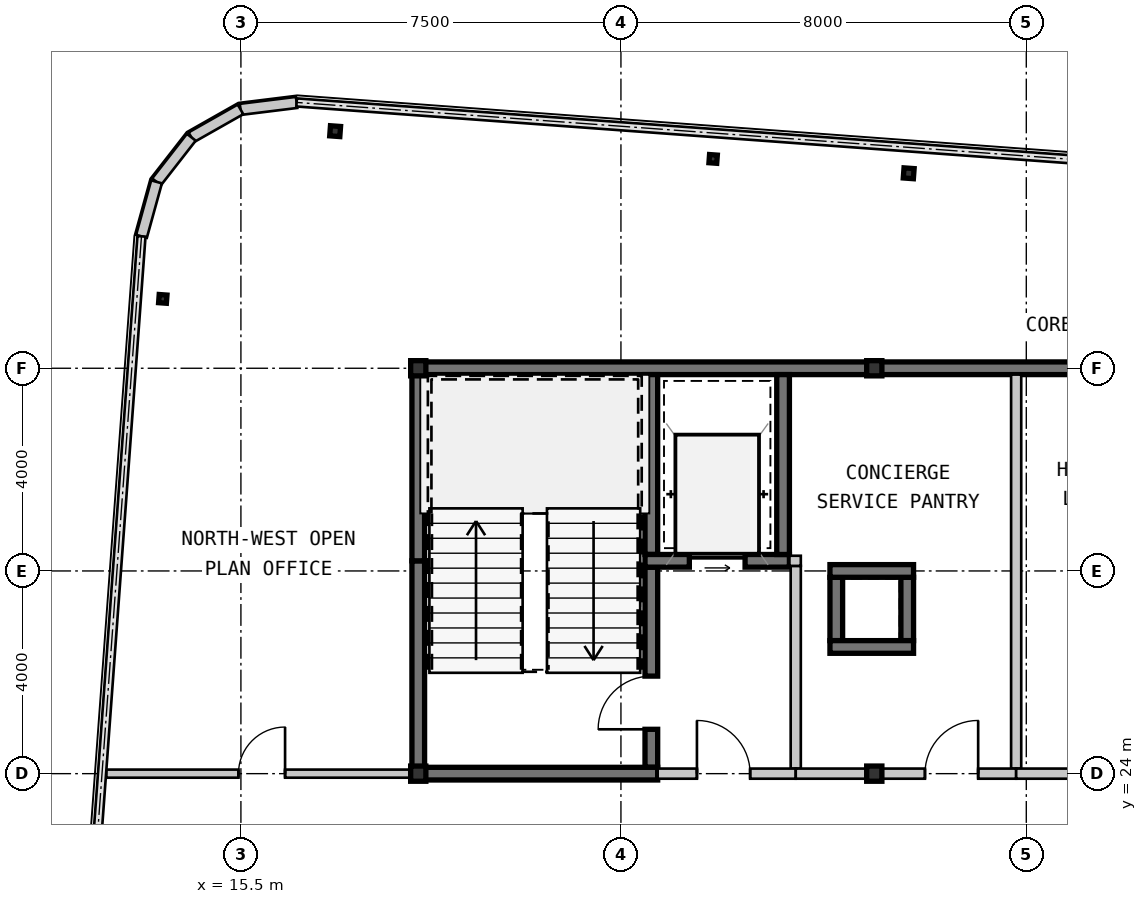
"""IFC4 building model, lengths in metres.
Left out: names, types, materials, properties, quantities, classifications, styles, units other than length and angle.
Written with IfcOpenShell. Run it as: python <this file> out.ifc"""

import sys

from ifc_helpers import new_model, si_unit, direction, frame, frame_2d, origin, origin_2d, place, context, subcontext, project, spatial, rectangle, hollow_rectangle, i_section, extrude, source, transform, mapped, element, fill, save


model = new_model("IFC4")
c1 = context("Model", 3, precision=1e-05, world=origin(), true_north=direction((0.0, 1.0)))
c2 = subcontext(c1, "Body", "Model", "MODEL_VIEW")
j1 = project(units=[si_unit("LENGTHUNIT", "METRE"), si_unit("PLANEANGLEUNIT", "RADIAN")], contexts=[c1])
p1 = place(None, origin())
s1 = spatial("IfcSite", under=j1, at=p1, CompositionType="ELEMENT")
p2 = place(p1, origin())
s2 = spatial("IfcBuilding", under=s1, at=p2, CompositionType="ELEMENT")
p3 = place(p2, frame((0.0, 0.0, 239.75)))
s3 = spatial("IfcBuildingStorey", under=s2, at=p3, CompositionType="ELEMENT", Elevation=239.75)
m1 = source(origin(), c2, "Body", "SweptSolid", [
    extrude(hollow_rectangle(XDim=0.3, YDim=0.3, WallThickness=0.012, at=origin_2d()), origin(), (0.0, 0.0, 1.0), 3.15),
])
for number, where, z_axis, x_axis in (
    (1, (19.0, 24.0, 0.0), (0.0, 0.0, 1.0), (1.0, 0.0, 0.0)),
    (2, (28.0, 24.0, 0.0), (0.0, 0.0, 1.0), (1.0, 0.0, 0.0)),
    (3, (19.0, 32.0, 0.0), (0.0, 0.0, 1.0), (1.0, 0.0, 0.0)),
    (4, (28.0, 32.0, 0.0), (0.0, 0.0, 1.0), (1.0, 0.0, 0.0)),
):
    element("IfcColumn", number, at=place(p3, frame(where, z_axis=z_axis, x_axis=x_axis)), inside=s3, PredefinedType="COLUMN", context=c2, shape_type="MappedRepresentation", body=[
        mapped(m1, transform((0.0, 0.0, 0.0), scale=1.0)),
    ])
m2 = source(origin(), c2, "Body", "SweptSolid", [
    extrude(hollow_rectangle(XDim=0.2, YDim=0.2, WallThickness=0.009, at=origin_2d()), origin(), (0.0, 0.0, 1.0), 3.15),
])
p4 = place(p3, frame((17.36, 36.679, 0.0), z_axis=(0.0, 0.0, 1.0), x_axis=(0.997314477224, -0.073238197128, 0.0)))
e5 = element("IfcColumn", 5, at=p4, inside=s3, PredefinedType="COLUMN", context=c2, shape_type="MappedRepresentation", body=[
    mapped(m2, transform((0.0, 0.0, 0.0), scale=1.0)),
])
m3 = source(origin(), c2, "Body", "SweptSolid", [
    extrude(i_section(OverallWidth=0.154, OverallDepth=0.162, WebThickness=0.008, FlangeThickness=0.011, at=origin_2d()), origin(), (0.0, 0.0, 1.0), 3.15),
])
for number, where, z_axis, x_axis in (
    (6, (24.82, 36.131, 0.0), (0.0, 0.0, 1.0), (0.997, -0.073, 0.0)),
    (7, (13.958, 33.369, 0.0), (0.0, 0.0, 1.0), (0.997, -0.073, 0.0)),
):
    element("IfcColumn", number, at=place(p3, frame(where, z_axis=z_axis, x_axis=x_axis)), inside=s3, PredefinedType="COLUMN", context=c2, shape_type="MappedRepresentation", body=[
        mapped(m3, transform((0.0, 0.0, 0.0), scale=1.0)),
    ])
p5 = place(p3, frame((28.679, 35.848, 0.0), z_axis=(0.0, 0.0, 1.0), x_axis=(0.997314477224, -0.073238197128, 0.0)))
e8 = element("IfcColumn", 8, at=p5, inside=s3, PredefinedType="COLUMN", context=c2, shape_type="MappedRepresentation", body=[
    mapped(m2, transform((0.0, 0.0, 0.0), scale=1.0)),
])
m4 = source(origin(), c2, "Body", "SweptSolid", [
    extrude(rectangle(XDim=1.116, YDim=0.22, at=frame_2d((0.558, 0.0))), origin(), (0.0, 0.0, 1.0), 2.93),
])
p6 = place(p3, frame((16.599, 37.246, 0.0), z_axis=(0.0, 0.0, 1.0), x_axis=(-0.992441899189, -0.122715429897, 0.0)))
e9 = element("IfcWall", 9, at=p6, inside=s3, PredefinedType="SOLIDWALL", context=c2, shape_type="MappedRepresentation", body=[
    mapped(m4, transform((0.0, 0.0, 0.0), scale=1.0)),
])
m5 = source(origin(), c2, "Body", "SweptSolid", [
    extrude(rectangle(XDim=1.116, YDim=0.22, at=frame_2d((0.558, 0.0))), origin(), (0.0, 0.0, 1.0), 2.93),
])
p7 = place(p3, frame((15.492, 37.109, 0.0), z_axis=(0.0, 0.0, 1.0), x_axis=(-0.869934579941, -0.493167138628, 0.0)))
e10 = element("IfcWall", 10, at=p7, inside=s3, PredefinedType="SOLIDWALL", context=c2, shape_type="MappedRepresentation", body=[
    mapped(m5, transform((0.0, 0.0, 0.0), scale=1.0)),
])
m6 = source(origin(), c2, "Body", "SweptSolid", [
    extrude(rectangle(XDim=1.116, YDim=0.22, at=frame_2d((0.558, 0.0))), origin(), (0.0, 0.0, 1.0), 2.93),
])
p8 = place(p3, frame((14.521, 36.559, 0.0), z_axis=(0.0, 0.0, 1.0), x_axis=(-0.614909386406, -0.788597772321, 0.0)))
e11 = element("IfcWall", 11, at=p8, inside=s3, PredefinedType="SOLIDWALL", context=c2, shape_type="MappedRepresentation", body=[
    mapped(m6, transform((0.0, 0.0, 0.0), scale=1.0)),
])
p9 = place(p3, frame((13.835, 35.679, 0.0), z_axis=(0.0, 0.0, 1.0), x_axis=(-0.266300605026, -0.963890028874, 0.0)))
e12 = element("IfcWall", 12, at=p9, inside=s3, PredefinedType="SOLIDWALL", context=c2, shape_type="MappedRepresentation", body=[
    mapped(m5, transform((0.0, 0.0, 0.0), scale=1.0)),
])
m7 = source(origin(), c2, "Body", "SweptSolid", [
    extrude(rectangle(XDim=9.125, YDim=0.25, at=frame_2d((4.562, 0.0))), origin(), (0.0, 0.0, 1.0), 2.93),
])
p10 = place(p3, frame((18.875, 32.0, 0.0), z_axis=(0.0, 0.0, 1.0), x_axis=(1.0, 0.0, 0.0)))
e13 = element("IfcWall", 13, at=p10, inside=s3, PredefinedType="SHEAR", context=c2, shape_type="MappedRepresentation", body=[
    mapped(m7, transform((0.0, 0.0, 0.0), scale=1.0)),
])
m8 = source(origin(), c2, "Body", "SweptSolid", [
    extrude(rectangle(XDim=11.2, YDim=0.25, at=frame_2d((5.6, 0.0))), origin(), (0.0, 0.0, 1.0), 2.93),
])
p11 = place(p3, frame((28.0, 32.0, 0.0), z_axis=(0.0, 0.0, 1.0), x_axis=(1.0, 0.0, 0.0)))
e14 = element("IfcWall", 14, at=p11, inside=s3, PredefinedType="SHEAR", context=c2, shape_type="MappedRepresentation", body=[
    mapped(m8, transform((0.0, 0.0, 0.0), scale=1.0)),
])
m9 = source(origin(), c2, "Body", "SweptSolid", [
    extrude(rectangle(XDim=4.075, YDim=0.25, at=frame_2d((2.038, 0.0))), origin(), (0.0, 0.0, 1.0), 2.93),
])
p12 = place(p3, frame((19.0, 24.125, 0.0), z_axis=(0.0, 0.0, 1.0), x_axis=(0.0, 1.0, 0.0)))
e15 = element("IfcWall", 15, at=p12, inside=s3, PredefinedType="SHEAR", context=c2, shape_type="MappedRepresentation", body=[
    mapped(m9, transform((0.0, 0.0, 0.0), scale=1.0)),
])
m10 = source(origin(), c2, "Body", "SweptSolid", [
    extrude(rectangle(XDim=3.675, YDim=0.25, at=frame_2d((1.837, 0.0))), origin(), (0.0, 0.0, 1.0), 2.93),
])
p13 = place(p3, frame((19.0, 28.2, 0.0), z_axis=(0.0, 0.0, 1.0), x_axis=(0.0, 1.0, 0.0)))
e16 = element("IfcWall", 16, at=p13, inside=s3, PredefinedType="SHEAR", context=c2, shape_type="MappedRepresentation", body=[
    mapped(m10, transform((0.0, 0.0, 0.0), scale=1.0)),
])
m11 = source(origin(), c2, "Body", "SweptSolid", [
    extrude(rectangle(XDim=3.55, YDim=0.25, at=frame_2d((1.775, 0.0))), origin(), (0.0, 0.0, 1.0), 2.93),
])
p14 = place(p3, frame((23.6, 28.325, 0.0), z_axis=(0.0, 0.0, 1.0), x_axis=(0.0, 1.0, 0.0)))
e17 = element("IfcWall", 17, at=p14, inside=s3, PredefinedType="SHEAR", context=c2, shape_type="MappedRepresentation", body=[
    mapped(m11, transform((0.0, 0.0, 0.0), scale=1.0)),
])
m12 = source(origin(), c2, "Body", "SweptSolid", [
    extrude(rectangle(XDim=3.95, YDim=0.25, at=frame_2d((1.975, 0.0))), origin(), (0.0, 0.0, 1.0), 2.93),
])
p15 = place(p3, frame((23.6, 24.125, 0.0), z_axis=(0.0, 0.0, 1.0), x_axis=(0.0, 1.0, 0.0)))
e18 = element("IfcWall", 18, at=p15, inside=s3, PredefinedType="SHEAR", context=c2, shape_type="MappedRepresentation", body=[
    mapped(m12, transform((0.0, 0.0, 0.0), scale=1.0)),
])
m13 = source(origin(), c2, "Body", "SweptSolid", [
    extrude(rectangle(XDim=1.05, YDim=2.1, at=frame_2d((0.525, 1.05))), frame((0.0, 0.135, 0.0), z_axis=(0.0, -1.0, 0.0), x_axis=(1.0, 0.0, 0.0)), (0.0, 0.0, 1.0), 0.27),
])
p16 = place(p15, frame((0.75, 0.0, 0.0)))
e19 = element("IfcOpeningElement", 19, at=p16, cuts=e18, PredefinedType="OPENING", context=c2, shape_type="MappedRepresentation", body=[
    mapped(m13, transform((0.0, 0.0, 0.0), scale=1.0)),
])
m14 = source(origin(), c2, "Body", "SweptSolid", [
    extrude(rectangle(XDim=4.85, YDim=0.25, at=frame_2d((2.425, 0.0))), origin(), (0.0, 0.0, 1.0), 2.93),
])
p17 = place(p3, frame((18.875, 24.0, 0.0), z_axis=(0.0, 0.0, 1.0), x_axis=(1.0, 0.0, 0.0)))
e20 = element("IfcWall", 20, at=p17, inside=s3, PredefinedType="SHEAR", context=c2, shape_type="MappedRepresentation", body=[
    mapped(m14, transform((0.0, 0.0, 0.0), scale=1.0)),
])
m15 = source(origin(), c2, "Body", "SweptSolid", [
    extrude(rectangle(XDim=2.85, YDim=0.25, at=frame_2d((1.425, 0.0))), origin(), (0.0, 0.0, 1.0), 2.93),
])
p18 = place(p3, frame((23.475, 28.2, 0.0), z_axis=(0.0, 0.0, 1.0), x_axis=(1.0, 0.0, 0.0)))
e21 = element("IfcWall", 21, at=p18, inside=s3, PredefinedType="SHEAR", context=c2, shape_type="MappedRepresentation", body=[
    mapped(m15, transform((0.0, 0.0, 0.0), scale=1.0)),
])
m16 = source(origin(), c2, "Body", "SweptSolid", [
    extrude(rectangle(XDim=1.1, YDim=2.15, at=frame_2d((0.55, 1.075))), frame((0.0, 0.135, 0.0), z_axis=(0.0, -1.0, 0.0), x_axis=(1.0, 0.0, 0.0)), (0.0, 0.0, 1.0), 0.27),
])
p19 = place(p18, frame((0.875, 0.0, 0.0)))
e22 = element("IfcOpeningElement", 22, at=p19, cuts=e21, PredefinedType="OPENING", context=c2, shape_type="MappedRepresentation", body=[
    mapped(m16, transform((0.0, 0.0, 0.0), scale=1.0)),
])
p20 = place(p3, frame((26.2, 28.325, 0.0), z_axis=(0.0, 0.0, 1.0), x_axis=(0.0, 1.0, 0.0)))
e23 = element("IfcWall", 23, at=p20, inside=s3, PredefinedType="SHEAR", context=c2, shape_type="MappedRepresentation", body=[
    mapped(m11, transform((0.0, 0.0, 0.0), scale=1.0)),
])
m17 = source(origin(), c2, "Body", "SweptSolid", [
    extrude(rectangle(XDim=4.0, YDim=0.2, at=frame_2d((2.0, 0.0))), origin(), (0.0, 0.0, 1.0), 2.93),
])
p21 = place(p3, frame((26.45, 24.1, 0.0), z_axis=(0.0, 0.0, 1.0), x_axis=(0.0, 1.0, 0.0)))
e24 = element("IfcWall", 24, at=p21, inside=s3, PredefinedType="SOLIDWALL", context=c2, shape_type="MappedRepresentation", body=[
    mapped(m17, transform((0.0, 0.0, 0.0), scale=1.0)),
])
m18 = source(origin(), c2, "Body", "SweptSolid", [
    extrude(rectangle(XDim=2.725, YDim=0.2, at=frame_2d((1.362, 0.0))), origin(), (0.0, 0.0, 1.0), 2.47),
])
p22 = place(p3, frame((23.725, 24.0, 0.0), z_axis=(0.0, 0.0, 1.0), x_axis=(1.0, 0.0, 0.0)))
e25 = element("IfcWall", 25, at=p22, inside=s3, PredefinedType="SOLIDWALL", context=c2, shape_type="MappedRepresentation", body=[
    mapped(m18, transform((0.0, 0.0, 0.0), scale=1.0)),
])
m19 = source(origin(), c2, "Body", "SweptSolid", [
    extrude(rectangle(XDim=1.05, YDim=2.1, at=frame_2d((0.525, 1.05))), frame((0.0, 0.11, 0.0), z_axis=(0.0, -1.0, 0.0), x_axis=(1.0, 0.0, 0.0)), (0.0, 0.0, 1.0), 0.22),
])
p23 = place(p22, frame((0.775, 0.0, 0.0)))
e26 = element("IfcOpeningElement", 26, at=p23, cuts=e25, PredefinedType="OPENING", context=c2, shape_type="MappedRepresentation", body=[
    mapped(m19, transform((0.0, 0.0, 0.0), scale=1.0)),
])
m20 = source(origin(), c2, "Body", "SweptSolid", [
    extrude(rectangle(XDim=1.25, YDim=0.25, at=frame_2d((0.625, 0.0))), origin(), (0.0, 0.0, 1.0), 2.93),
])
for number, where, z_axis, x_axis in (
    (27, (28.65, 26.625, 0.0), (0.0, 0.0, 1.0), (0.0, 1.0, 0.0)),
    (28, (27.25, 27.875, 0.0), (0.0, 0.0, 1.0), (0.0, -1.0, 0.0)),
):
    element("IfcWall", number, at=place(p3, frame(where, z_axis=z_axis, x_axis=x_axis)), inside=s3, PredefinedType="SHEAR", context=c2, shape_type="MappedRepresentation", body=[
        mapped(m20, transform((0.0, 0.0, 0.0), scale=1.0)),
    ])
m21 = source(origin(), c2, "Body", "SweptSolid", [
    extrude(rectangle(XDim=1.65, YDim=0.25, at=frame_2d((0.825, 0.0))), origin(), (0.0, 0.0, 1.0), 2.93),
])
for number, where, z_axis, x_axis in (
    (29, (28.775, 28.0, 0.0), (0.0, 0.0, 1.0), (-1.0, 0.0, 0.0)),
    (30, (27.125, 26.5, 0.0), (0.0, 0.0, 1.0), (1.0, 0.0, 0.0)),
):
    element("IfcWall", number, at=place(p3, frame(where, z_axis=z_axis, x_axis=x_axis)), inside=s3, PredefinedType="SHEAR", context=c2, shape_type="MappedRepresentation", body=[
        mapped(m21, transform((0.0, 0.0, 0.0), scale=1.0)),
    ])
m22 = source(origin(), c2, "Body", "SweptSolid", [
    extrude(rectangle(XDim=7.775, YDim=0.2, at=frame_2d((3.887, 0.0))), origin(), (0.0, 0.0, 1.0), 2.93),
])
p24 = place(p3, frame((30.8, 31.875, 0.0), z_axis=(0.0, 0.0, 1.0), x_axis=(0.0, -1.0, 0.0)))
e31 = element("IfcWall", 31, at=p24, inside=s3, PredefinedType="SOLIDWALL", context=c2, shape_type="MappedRepresentation", body=[
    mapped(m22, transform((0.0, 0.0, 0.0), scale=1.0)),
])
m23 = source(origin(), c2, "Body", "SweptSolid", [
    extrude(rectangle(XDim=4.35, YDim=0.2, at=frame_2d((2.175, 0.0))), origin(), (0.0, 0.0, 1.0), 2.47),
])
p25 = place(p3, frame((30.8, 24.0, 0.0), z_axis=(0.0, 0.0, 1.0), x_axis=(-1.0, 0.0, 0.0)))
e32 = element("IfcWall", 32, at=p25, inside=s3, PredefinedType="SOLIDWALL", context=c2, shape_type="MappedRepresentation", body=[
    mapped(m23, transform((0.0, 0.0, 0.0), scale=1.0)),
])
p26 = place(p25, frame((0.75, 0.0, 0.0)))
e33 = element("IfcOpeningElement", 33, at=p26, cuts=e32, PredefinedType="OPENING", context=c2, shape_type="MappedRepresentation", body=[
    mapped(m19, transform((0.0, 0.0, 0.0), scale=1.0)),
])
m24 = source(origin(), c2, "Body", "SweptSolid", [
    extrude(rectangle(XDim=4.35, YDim=0.2, at=frame_2d((2.175, 0.0))), origin(), (0.0, 0.0, 1.0), 2.47),
])
p27 = place(p3, frame((35.15, 24.0, 0.0), z_axis=(0.0, 0.0, 1.0), x_axis=(-1.0, 0.0, 0.0)))
e34 = element("IfcWall", 34, at=p27, inside=s3, PredefinedType="SOLIDWALL", context=c2, shape_type="MappedRepresentation", body=[
    mapped(m24, transform((0.0, 0.0, 0.0), scale=1.0)),
])
p28 = place(p27, frame((1.65, 0.0, 0.0)))
e35 = element("IfcOpeningElement", 35, at=p28, cuts=e34, PredefinedType="OPENING", context=c2, shape_type="MappedRepresentation", body=[
    mapped(m19, transform((0.0, 0.0, 0.0), scale=1.0)),
])
m25 = source(origin(), c2, "Body", "SweptSolid", [
    extrude(rectangle(XDim=6.032, YDim=0.16, at=frame_2d((3.016, 0.0))), origin(), (0.0, 0.0, 1.0), 2.93),
])
p29 = place(p3, frame((12.843, 24.0, 0.0), z_axis=(0.0, 0.0, 1.0), x_axis=(1.0, 0.0, 0.0)))
e36 = element("IfcWall", 36, at=p29, inside=s3, PredefinedType="PARTITIONING", context=c2, shape_type="MappedRepresentation", body=[
    mapped(m25, transform((0.0, 0.0, 0.0), scale=1.0)),
])
m26 = source(origin(), c2, "Body", "SweptSolid", [
    extrude(rectangle(XDim=0.92, YDim=2.1, at=frame_2d((0.46, 1.05))), frame((0.0, 0.09, 0.0), z_axis=(0.0, -1.0, 0.0), x_axis=(1.0, 0.0, 0.0)), (0.0, 0.0, 1.0), 0.18),
])
p30 = place(p29, frame((2.608, 0.0, 0.0)))
e37 = element("IfcOpeningElement", 37, at=p30, cuts=e36, PredefinedType="OPENING", context=c2, shape_type="MappedRepresentation", body=[
    mapped(m26, transform((0.0, 0.0, 0.0), scale=1.0)),
])
m27 = source(origin(), c2, "Body", "SweptSolid", [
    extrude(rectangle(XDim=0.225, YDim=0.2, at=frame_2d((0.113, 0.0))), origin(), (0.0, 0.0, 1.0), 2.93),
])
p31 = place(p3, frame((26.325, 28.2, 0.0), z_axis=(0.0, 0.0, 1.0), x_axis=(1.0, 0.0, 0.0)))
e38 = element("IfcWall", 38, at=p31, inside=s3, PredefinedType="SOLIDWALL", context=c2, shape_type="MappedRepresentation", body=[
    mapped(m27, transform((0.0, 0.0, 0.0), scale=1.0)),
])
m28 = source(origin(), c2, "Body", "SweptSolid", [
    extrude(rectangle(XDim=1.05, YDim=2.1, at=frame_2d((0.525, 1.05))), frame((0.0, 0.025, 0.0), z_axis=(0.0, -1.0, 0.0), x_axis=(1.0, 0.0, 0.0)), (0.0, 0.0, 1.0), 0.05),
])
p32 = place(p16, origin())
e39 = element("IfcDoor", 39, at=p32, inside=s3, OperationType="SINGLE_SWING_LEFT", PredefinedType="DOOR", context=c2, shape_type="MappedRepresentation", body=[
    mapped(m28, transform((0.0, 0.0, 0.0), scale=1.0)),
])
fill(e19, e39)
m29 = source(origin(), c2, "Body", "SweptSolid", [
    extrude(rectangle(XDim=1.1, YDim=2.15, at=frame_2d((0.55, 1.075))), frame((0.0, 0.025, 0.0), z_axis=(0.0, -1.0, 0.0), x_axis=(1.0, 0.0, 0.0)), (0.0, 0.0, 1.0), 0.05),
])
p33 = place(p19, origin())
e40 = element("IfcDoor", 40, at=p33, inside=s3, OperationType="SLIDING_TO_LEFT", PredefinedType="DOOR", context=c2, shape_type="MappedRepresentation", body=[
    mapped(m29, transform((0.0, 0.0, 0.0), scale=1.0)),
])
fill(e22, e40)
p34 = place(p23, origin())
e41 = element("IfcDoor", 41, at=p34, inside=s3, OperationType="SINGLE_SWING_LEFT", PredefinedType="DOOR", context=c2, shape_type="MappedRepresentation", body=[
    mapped(m28, transform((0.0, 0.0, 0.0), scale=1.0)),
])
fill(e26, e41)
p35 = place(p26, frame((1.05, 0.0, 0.0), z_axis=(0.0, 0.0, 1.0), x_axis=(-1.0, 0.0, 0.0)))
e42 = element("IfcDoor", 42, at=p35, inside=s3, OperationType="SINGLE_SWING_RIGHT", PredefinedType="DOOR", context=c2, shape_type="MappedRepresentation", body=[
    mapped(m28, transform((0.0, 0.0, 0.0), scale=1.0)),
])
fill(e33, e42)
m30 = source(origin(), c2, "Body", "SweptSolid", [
    extrude(rectangle(XDim=0.92, YDim=2.1, at=frame_2d((0.46, 1.05))), frame((0.0, 0.025, 0.0), z_axis=(0.0, -1.0, 0.0), x_axis=(1.0, 0.0, 0.0)), (0.0, 0.0, 1.0), 0.05),
])
p36 = place(p30, origin())
e43 = element("IfcDoor", 43, at=p36, inside=s3, OperationType="SINGLE_SWING_RIGHT", PredefinedType="DOOR", context=c2, shape_type="MappedRepresentation", body=[
    mapped(m30, transform((0.0, 0.0, 0.0), scale=1.0)),
])
fill(e37, e43)
save(model, sys.argv[1])
